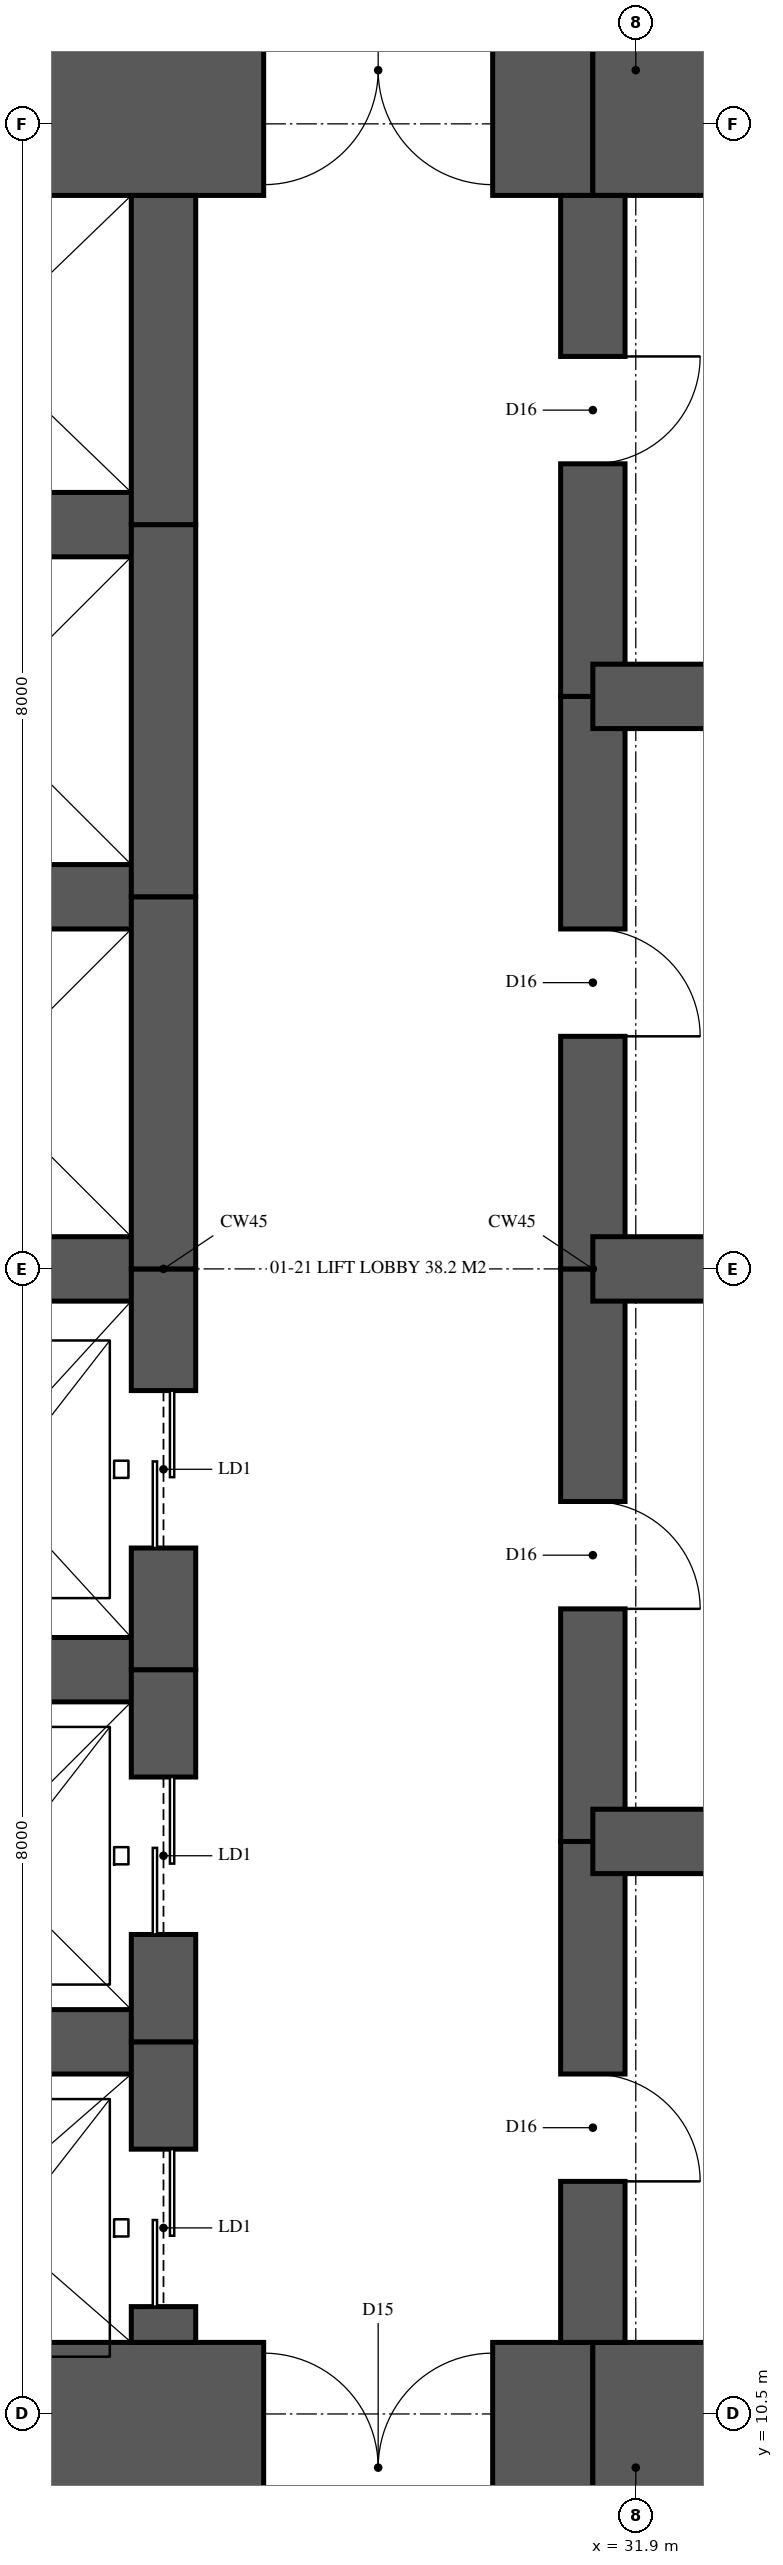
"""IFC4 building model, lengths in metres.
Left out: names, types, materials, properties, quantities, classifications, styles, units other than length and angle.
Written with IfcOpenShell. Run it as: python <this file> out.ifc"""

import sys

from ifc_helpers import new_model, si_unit, direction, frame, frame_2d, origin, place, context, subcontext, project, spatial, rectangle, extrude, element, fill, save


model = new_model("IFC4")
c1 = context("Model", 3, precision=1e-05, world=origin(), true_north=direction((0.0, 1.0)))
c2 = subcontext(c1, "Body", "Model", "MODEL_VIEW")
j1 = project(units=[si_unit("LENGTHUNIT", "METRE"), si_unit("PLANEANGLEUNIT", "RADIAN")], contexts=[c1])
p1 = place(None, origin())
s1 = spatial("IfcSite", under=j1, at=p1, CompositionType="ELEMENT")
p2 = place(p1, origin())
s2 = spatial("IfcBuilding", under=s1, at=p2, CompositionType="ELEMENT")
p3 = place(p2, frame((0.0, 0.0, 6.0)))
s3 = spatial("IfcBuildingStorey", under=s2, at=p3, CompositionType="ELEMENT", Elevation=6.0)
p4 = place(p3, frame((26.0, 10.125, 0.0), z_axis=(0.0, 0.0, 1.0), x_axis=(1.0, 0.0, 0.0)))
e1 = element("IfcWall", 1, at=p4, inside=s3, PredefinedType="SHEAR", context=c2, shape_type="SweptSolid", body=[
    extrude(rectangle(XDim=5.6, YDim=1.75, at=frame_2d((2.8, 0.0))), origin(), (0.0, 0.0, 1.0), 5.0),
])
p5 = place(p4, frame((3.3, 0.0, 0.0)))
e2 = element("IfcOpeningElement", 2, at=p5, cuts=e1, PredefinedType="OPENING", context=c2, shape_type="SweptSolid", body=[
    extrude(rectangle(XDim=1.6, YDim=2.1, at=frame_2d((0.8, 1.05))), frame((0.0, 0.885, 0.0), z_axis=(0.0, -1.0, 0.0), x_axis=(1.0, 0.0, 0.0)), (0.0, 0.0, 1.0), 1.77),
])
for number, where, z_axis, x_axis in (
    (3, (31.6, 10.125, 0.0), (0.0, 0.0, 1.0), (1.0, 0.0, 0.0)),
    (4, (35.9, 26.875, 0.0), (0.0, 0.0, 1.0), (-1.0, 0.0, 0.0)),
):
    element("IfcWall", number, at=place(p3, frame(where, z_axis=z_axis, x_axis=x_axis)), inside=s3, PredefinedType="SHEAR", context=c2, shape_type="SweptSolid", body=[
        extrude(rectangle(XDim=4.3, YDim=1.75, at=frame_2d((2.15, 0.0))), origin(), (0.0, 0.0, 1.0), 5.0),
    ])
p6 = place(p3, frame((31.6, 26.875, 0.0), z_axis=(0.0, 0.0, 1.0), x_axis=(-1.0, 0.0, 0.0)))
e5 = element("IfcWall", 5, at=p6, inside=s3, PredefinedType="SHEAR", context=c2, shape_type="SweptSolid", body=[
    extrude(rectangle(XDim=5.6, YDim=1.75, at=frame_2d((2.8, 0.0))), origin(), (0.0, 0.0, 1.0), 5.0),
])
p7 = place(p6, frame((0.7, 0.0, 0.0)))
e6 = element("IfcOpeningElement", 6, at=p7, cuts=e5, PredefinedType="OPENING", context=c2, shape_type="SweptSolid", body=[
    extrude(rectangle(XDim=1.6, YDim=2.1, at=frame_2d((0.8, 1.05))), frame((0.0, 0.885, 0.0), z_axis=(0.0, -1.0, 0.0), x_axis=(1.0, 0.0, 0.0)), (0.0, 0.0, 1.0), 1.77),
])
p8 = place(p3, frame((28.6, 11.0, 0.0), z_axis=(0.0, 0.0, 1.0), x_axis=(0.0, 1.0, 0.0)))
e7 = element("IfcWall", 7, at=p8, inside=s3, PredefinedType="SHEAR", context=c2, shape_type="SweptSolid", body=[
    extrude(rectangle(XDim=2.1, YDim=0.45, at=frame_2d((1.05, 0.0))), origin(), (0.0, 0.0, 1.0), 5.0),
])
p9 = place(p8, frame((0.25, 0.0, 0.0)))
e8 = element("IfcOpeningElement", 8, at=p9, cuts=e7, PredefinedType="OPENING", context=c2, shape_type="SweptSolid", body=[
    extrude(rectangle(XDim=1.1, YDim=2.1, at=frame_2d((0.55, 1.05))), frame((0.0, 0.235, 0.0), z_axis=(0.0, -1.0, 0.0), x_axis=(1.0, 0.0, 0.0)), (0.0, 0.0, 1.0), 0.47),
])
p10 = place(p3, frame((28.6, 13.1, 0.0), z_axis=(0.0, 0.0, 1.0), x_axis=(0.0, 1.0, 0.0)))
e9 = element("IfcWall", 9, at=p10, inside=s3, PredefinedType="SHEAR", context=c2, shape_type="SweptSolid", body=[
    extrude(rectangle(XDim=2.6, YDim=0.45, at=frame_2d((1.3, 0.0))), origin(), (0.0, 0.0, 1.0), 5.0),
])
p11 = place(p10, frame((0.75, 0.0, 0.0)))
e10 = element("IfcOpeningElement", 10, at=p11, cuts=e9, PredefinedType="OPENING", context=c2, shape_type="SweptSolid", body=[
    extrude(rectangle(XDim=1.1, YDim=2.1, at=frame_2d((0.55, 1.05))), frame((0.0, 0.235, 0.0), z_axis=(0.0, -1.0, 0.0), x_axis=(1.0, 0.0, 0.0)), (0.0, 0.0, 1.0), 0.47),
])
p12 = place(p3, frame((28.6, 15.7, 0.0), z_axis=(0.0, 0.0, 1.0), x_axis=(0.0, 1.0, 0.0)))
e11 = element("IfcWall", 11, at=p12, inside=s3, PredefinedType="SHEAR", context=c2, shape_type="SweptSolid", body=[
    extrude(rectangle(XDim=2.8, YDim=0.45, at=frame_2d((1.4, 0.0))), origin(), (0.0, 0.0, 1.0), 5.0),
])
p13 = place(p12, frame((0.85, 0.0, 0.0)))
e12 = element("IfcOpeningElement", 12, at=p13, cuts=e11, PredefinedType="OPENING", context=c2, shape_type="SweptSolid", body=[
    extrude(rectangle(XDim=1.1, YDim=2.1, at=frame_2d((0.55, 1.05))), frame((0.0, 0.235, 0.0), z_axis=(0.0, -1.0, 0.0), x_axis=(1.0, 0.0, 0.0)), (0.0, 0.0, 1.0), 0.47),
])
p14 = place(p3, frame((28.6, 18.5, 0.0), z_axis=(0.0, 0.0, 1.0), x_axis=(0.0, 1.0, 0.0)))
e13 = element("IfcWall", 13, at=p14, inside=s3, PredefinedType="SHEAR", context=c2, shape_type="SweptSolid", body=[
    extrude(rectangle(XDim=2.6, YDim=0.45, at=frame_2d((1.3, 0.0))), origin(), (0.0, 0.0, 1.0), 5.0),
])
p15 = place(p3, frame((28.6, 21.1, 0.0), z_axis=(0.0, 0.0, 1.0), x_axis=(0.0, 1.0, 0.0)))
e14 = element("IfcWall", 14, at=p15, inside=s3, PredefinedType="SHEAR", context=c2, shape_type="SweptSolid", body=[
    extrude(rectangle(XDim=2.6, YDim=0.45, at=frame_2d((1.3, 0.0))), origin(), (0.0, 0.0, 1.0), 5.0),
])
p16 = place(p3, frame((28.6, 23.7, 0.0), z_axis=(0.0, 0.0, 1.0), x_axis=(0.0, 1.0, 0.0)))
e15 = element("IfcWall", 15, at=p16, inside=s3, PredefinedType="SHEAR", context=c2, shape_type="SweptSolid", body=[
    extrude(rectangle(XDim=2.3, YDim=0.45, at=frame_2d((1.15, 0.0))), origin(), (0.0, 0.0, 1.0), 5.0),
])
p17 = place(p3, frame((31.6, 11.0, 0.0), z_axis=(0.0, 0.0, 1.0), x_axis=(0.0, 1.0, 0.0)))
e16 = element("IfcWall", 16, at=p17, inside=s3, PredefinedType="SHEAR", context=c2, shape_type="SweptSolid", body=[
    extrude(rectangle(XDim=3.5, YDim=0.45, at=frame_2d((1.75, 0.0))), origin(), (0.0, 0.0, 1.0), 5.0),
])
p18 = place(p17, frame((1.125, 0.0, 0.0)))
e17 = element("IfcOpeningElement", 17, at=p18, cuts=e16, PredefinedType="OPENING", context=c2, shape_type="SweptSolid", body=[
    extrude(rectangle(XDim=0.75, YDim=2.1, at=frame_2d((0.375, 1.05))), frame((0.0, 0.235, 0.0), z_axis=(0.0, -1.0, 0.0), x_axis=(1.0, 0.0, 0.0)), (0.0, 0.0, 1.0), 0.47),
])
p19 = place(p3, frame((31.6, 14.5, 0.0), z_axis=(0.0, 0.0, 1.0), x_axis=(0.0, 1.0, 0.0)))
e18 = element("IfcWall", 18, at=p19, inside=s3, PredefinedType="SHEAR", context=c2, shape_type="SweptSolid", body=[
    extrude(rectangle(XDim=4.0, YDim=0.45, at=frame_2d((2.0, 0.0))), origin(), (0.0, 0.0, 1.0), 5.0),
])
p20 = place(p19, frame((1.625, 0.0, 0.0)))
e19 = element("IfcOpeningElement", 19, at=p20, cuts=e18, PredefinedType="OPENING", context=c2, shape_type="SweptSolid", body=[
    extrude(rectangle(XDim=0.75, YDim=2.1, at=frame_2d((0.375, 1.05))), frame((0.0, 0.235, 0.0), z_axis=(0.0, -1.0, 0.0), x_axis=(1.0, 0.0, 0.0)), (0.0, 0.0, 1.0), 0.47),
])
p21 = place(p3, frame((31.6, 18.5, 0.0), z_axis=(0.0, 0.0, 1.0), x_axis=(0.0, 1.0, 0.0)))
e20 = element("IfcWall", 20, at=p21, inside=s3, PredefinedType="SHEAR", context=c2, shape_type="SweptSolid", body=[
    extrude(rectangle(XDim=4.0, YDim=0.45, at=frame_2d((2.0, 0.0))), origin(), (0.0, 0.0, 1.0), 5.0),
])
p22 = place(p21, frame((1.625, 0.0, 0.0)))
e21 = element("IfcOpeningElement", 21, at=p22, cuts=e20, PredefinedType="OPENING", context=c2, shape_type="SweptSolid", body=[
    extrude(rectangle(XDim=0.75, YDim=2.1, at=frame_2d((0.375, 1.05))), frame((0.0, 0.235, 0.0), z_axis=(0.0, -1.0, 0.0), x_axis=(1.0, 0.0, 0.0)), (0.0, 0.0, 1.0), 0.47),
])
p23 = place(p3, frame((31.6, 22.5, 0.0), z_axis=(0.0, 0.0, 1.0), x_axis=(0.0, 1.0, 0.0)))
e22 = element("IfcWall", 22, at=p23, inside=s3, PredefinedType="SHEAR", context=c2, shape_type="SweptSolid", body=[
    extrude(rectangle(XDim=3.5, YDim=0.45, at=frame_2d((1.75, 0.0))), origin(), (0.0, 0.0, 1.0), 5.0),
])
p24 = place(p23, frame((1.625, 0.0, 0.0)))
e23 = element("IfcOpeningElement", 23, at=p24, cuts=e22, PredefinedType="OPENING", context=c2, shape_type="SweptSolid", body=[
    extrude(rectangle(XDim=0.75, YDim=2.1, at=frame_2d((0.375, 1.05))), frame((0.0, 0.235, 0.0), z_axis=(0.0, -1.0, 0.0), x_axis=(1.0, 0.0, 0.0)), (0.0, 0.0, 1.0), 0.47),
])
for number, where, z_axis, x_axis in (
    (24, (26.0, 13.1, 0.0), (0.0, 0.0, 1.0), (1.0, 0.0, 0.0)),
    (25, (26.0, 15.7, 0.0), (0.0, 0.0, 1.0), (1.0, 0.0, 0.0)),
    (26, (26.0, 18.5, 0.0), (0.0, 0.0, 1.0), (1.0, 0.0, 0.0)),
    (27, (26.0, 21.1, 0.0), (0.0, 0.0, 1.0), (1.0, 0.0, 0.0)),
    (28, (26.0, 23.7, 0.0), (0.0, 0.0, 1.0), (1.0, 0.0, 0.0)),
):
    element("IfcWall", number, at=place(p3, frame(where, z_axis=z_axis, x_axis=x_axis)), inside=s3, PredefinedType="SHEAR", context=c2, shape_type="SweptSolid", body=[
        extrude(rectangle(XDim=2.6, YDim=0.45, at=frame_2d((1.3, 0.0))), origin(), (0.0, 0.0, 1.0), 5.0),
    ])
for number, where, z_axis, x_axis in (
    (29, (31.6, 14.5, 0.0), (0.0, 0.0, 1.0), (1.0, 0.0, 0.0)),
    (30, (31.6, 18.5, 0.0), (0.0, 0.0, 1.0), (1.0, 0.0, 0.0)),
    (31, (31.6, 22.5, 0.0), (0.0, 0.0, 1.0), (1.0, 0.0, 0.0)),
):
    element("IfcWall", number, at=place(p3, frame(where, z_axis=z_axis, x_axis=x_axis)), inside=s3, PredefinedType="SHEAR", context=c2, shape_type="SweptSolid", body=[
        extrude(rectangle(XDim=4.3, YDim=0.45, at=frame_2d((2.15, 0.0))), origin(), (0.0, 0.0, 1.0), 5.0),
    ])
p25 = place(p9, origin())
e32 = element("IfcDoor", 32, at=p25, inside=s3, OperationType="SLIDING_TO_LEFT", PredefinedType="DOOR", context=c2, shape_type="SweptSolid", body=[
    extrude(rectangle(XDim=1.1, YDim=2.1, at=frame_2d((0.55, 1.05))), frame((0.0, 0.025, 0.0), z_axis=(0.0, -1.0, 0.0), x_axis=(1.0, 0.0, 0.0)), (0.0, 0.0, 1.0), 0.05),
])
fill(e8, e32)
p26 = place(p11, origin())
e33 = element("IfcDoor", 33, at=p26, inside=s3, OperationType="SLIDING_TO_LEFT", PredefinedType="DOOR", context=c2, shape_type="SweptSolid", body=[
    extrude(rectangle(XDim=1.1, YDim=2.1, at=frame_2d((0.55, 1.05))), frame((0.0, 0.025, 0.0), z_axis=(0.0, -1.0, 0.0), x_axis=(1.0, 0.0, 0.0)), (0.0, 0.0, 1.0), 0.05),
])
fill(e10, e33)
p27 = place(p13, origin())
e34 = element("IfcDoor", 34, at=p27, inside=s3, OperationType="SLIDING_TO_LEFT", PredefinedType="DOOR", context=c2, shape_type="SweptSolid", body=[
    extrude(rectangle(XDim=1.1, YDim=2.1, at=frame_2d((0.55, 1.05))), frame((0.0, 0.025, 0.0), z_axis=(0.0, -1.0, 0.0), x_axis=(1.0, 0.0, 0.0)), (0.0, 0.0, 1.0), 0.05),
])
fill(e12, e34)
p28 = place(p5, origin())
e35 = element("IfcDoor", 35, at=p28, inside=s3, OperationType="DOUBLE_DOOR_SINGLE_SWING", PredefinedType="DOOR", context=c2, shape_type="SweptSolid", body=[
    extrude(rectangle(XDim=1.6, YDim=2.1, at=frame_2d((0.8, 1.05))), frame((0.0, 0.025, 0.0), z_axis=(0.0, -1.0, 0.0), x_axis=(1.0, 0.0, 0.0)), (0.0, 0.0, 1.0), 0.05),
])
fill(e2, e35)
p29 = place(p7, origin())
e36 = element("IfcDoor", 36, at=p29, inside=s3, OperationType="DOUBLE_DOOR_SINGLE_SWING", PredefinedType="DOOR", context=c2, shape_type="SweptSolid", body=[
    extrude(rectangle(XDim=1.6, YDim=2.1, at=frame_2d((0.8, 1.05))), frame((0.0, 0.025, 0.0), z_axis=(0.0, -1.0, 0.0), x_axis=(1.0, 0.0, 0.0)), (0.0, 0.0, 1.0), 0.05),
])
fill(e6, e36)
p30 = place(p18, frame((0.75, 0.0, 0.0), z_axis=(0.0, 0.0, 1.0), x_axis=(-1.0, 0.0, 0.0)))
e37 = element("IfcDoor", 37, at=p30, inside=s3, OperationType="SINGLE_SWING_RIGHT", PredefinedType="DOOR", context=c2, shape_type="SweptSolid", body=[
    extrude(rectangle(XDim=0.75, YDim=2.1, at=frame_2d((0.375, 1.05))), frame((0.0, 0.025, 0.0), z_axis=(0.0, -1.0, 0.0), x_axis=(1.0, 0.0, 0.0)), (0.0, 0.0, 1.0), 0.05),
])
fill(e17, e37)
p31 = place(p20, frame((0.75, 0.0, 0.0), z_axis=(0.0, 0.0, 1.0), x_axis=(-1.0, 0.0, 0.0)))
e38 = element("IfcDoor", 38, at=p31, inside=s3, OperationType="SINGLE_SWING_RIGHT", PredefinedType="DOOR", context=c2, shape_type="SweptSolid", body=[
    extrude(rectangle(XDim=0.75, YDim=2.1, at=frame_2d((0.375, 1.05))), frame((0.0, 0.025, 0.0), z_axis=(0.0, -1.0, 0.0), x_axis=(1.0, 0.0, 0.0)), (0.0, 0.0, 1.0), 0.05),
])
fill(e19, e38)
p32 = place(p22, frame((0.75, 0.0, 0.0), z_axis=(0.0, 0.0, 1.0), x_axis=(-1.0, 0.0, 0.0)))
e39 = element("IfcDoor", 39, at=p32, inside=s3, OperationType="SINGLE_SWING_RIGHT", PredefinedType="DOOR", context=c2, shape_type="SweptSolid", body=[
    extrude(rectangle(XDim=0.75, YDim=2.1, at=frame_2d((0.375, 1.05))), frame((0.0, 0.025, 0.0), z_axis=(0.0, -1.0, 0.0), x_axis=(1.0, 0.0, 0.0)), (0.0, 0.0, 1.0), 0.05),
])
fill(e21, e39)
p33 = place(p24, frame((0.75, 0.0, 0.0), z_axis=(0.0, 0.0, 1.0), x_axis=(-1.0, 0.0, 0.0)))
e40 = element("IfcDoor", 40, at=p33, inside=s3, OperationType="SINGLE_SWING_LEFT", PredefinedType="DOOR", context=c2, shape_type="SweptSolid", body=[
    extrude(rectangle(XDim=0.75, YDim=2.1, at=frame_2d((0.375, 1.05))), frame((0.0, 0.025, 0.0), z_axis=(0.0, -1.0, 0.0), x_axis=(1.0, 0.0, 0.0)), (0.0, 0.0, 1.0), 0.05),
])
fill(e23, e40)
save(model, sys.argv[1])
